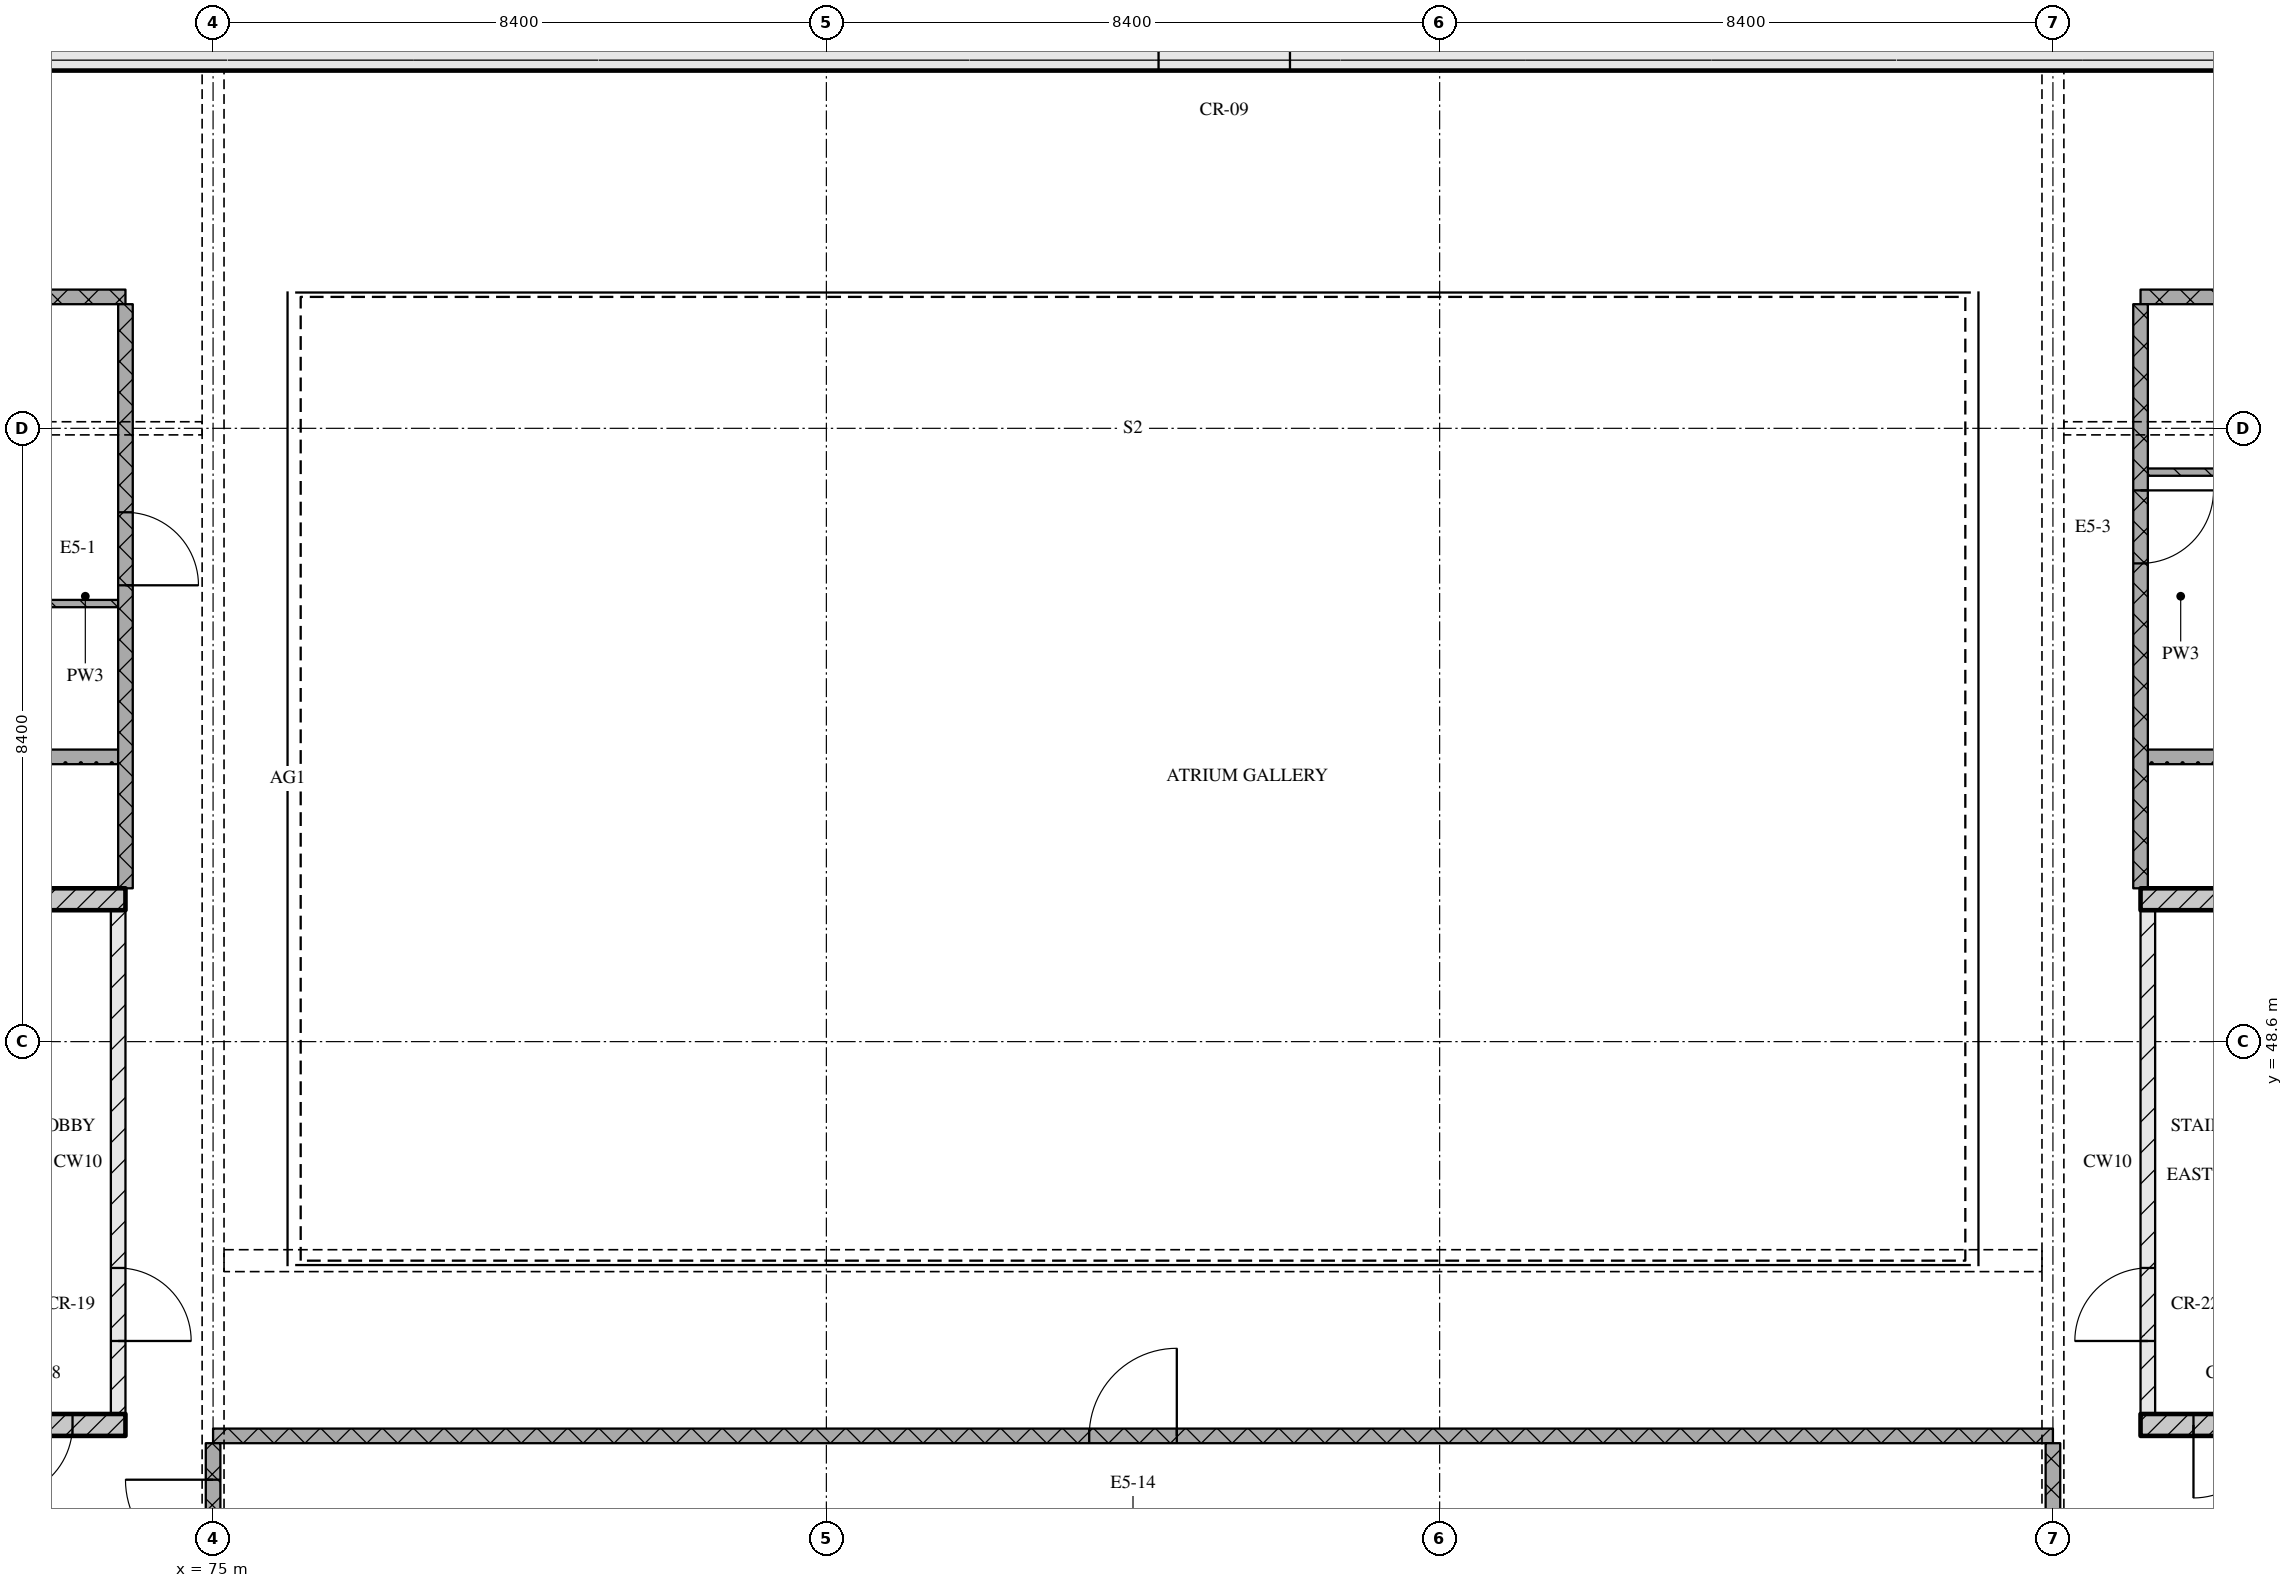
"""IFC4 building model, lengths in metres.
Left out: names, types, materials, properties, quantities, classifications, styles, units other than length and angle.
Written with IfcOpenShell. Run it as: python <this file> out.ifc"""

import sys

from ifc_helpers import new_model, si_unit, direction, frame, frame_2d, origin, place, context, subcontext, project, spatial, rectangle, extrude, element, fill, save


model = new_model("IFC4")
c1 = context("Model", 3, precision=1e-05, world=origin(), true_north=direction((0.0, 1.0)))
c2 = subcontext(c1, "Body", "Model", "MODEL_VIEW")
j1 = project(units=[si_unit("LENGTHUNIT", "METRE"), si_unit("PLANEANGLEUNIT", "RADIAN")], contexts=[c1])
p1 = place(None, origin())
s1 = spatial("IfcSite", under=j1, at=p1, CompositionType="ELEMENT")
p2 = place(p1, origin())
s2 = spatial("IfcBuilding", under=s1, at=p2, CompositionType="ELEMENT")
p3 = place(p2, frame((0.0, 0.0, 295.95)))
s3 = spatial("IfcBuildingStorey", under=s2, at=p3, CompositionType="ELEMENT", Elevation=295.95)
p4 = place(p3, frame((67.3, 62.15, 0.0), z_axis=(0.0, 0.0, 1.0), x_axis=(1.0, 0.0, 0.0)))
e1 = element("IfcWall", 1, at=p4, inside=s3, PredefinedType="SOLIDWALL", context=c2, shape_type="SweptSolid", body=[
    extrude(rectangle(XDim=40.6, YDim=0.5, at=frame_2d((20.3, 0.0))), origin(), (0.0, 0.0, 1.0), 3.32),
])
p5 = place(p4, frame((20.65, 0.0, 0.0)))
e2 = element("IfcOpeningElement", 2, at=p5, cuts=e1, PredefinedType="OPENING", context=c2, shape_type="SweptSolid", body=[
    extrude(rectangle(XDim=1.8, YDim=2.1, at=frame_2d((0.9, 1.05))), frame((0.0, 0.26, 0.0), z_axis=(0.0, -1.0, 0.0), x_axis=(1.0, 0.0, 0.0)), (0.0, 0.0, 1.0), 0.52),
])
p6 = place(p3, frame((68.2, 43.35, 0.0), z_axis=(0.0, 0.0, 1.0), x_axis=(1.0, 0.0, 0.0)))
e3 = element("IfcWall", 3, at=p6, inside=s3, PredefinedType="SOLIDWALL", context=c2, shape_type="SweptSolid", body=[
    extrude(rectangle(XDim=5.6, YDim=0.3, at=frame_2d((2.8, 0.0))), origin(), (0.0, 0.0, 1.0), 3.32),
])
p7 = place(p6, frame((3.875, 0.0, 0.0)))
e4 = element("IfcOpeningElement", 4, at=p7, cuts=e3, PredefinedType="OPENING", context=c2, shape_type="SweptSolid", body=[
    extrude(rectangle(XDim=1.0, YDim=2.1, at=frame_2d((0.5, 1.05))), frame((0.0, 0.16, 0.0), z_axis=(0.0, -1.0, 0.0), x_axis=(1.0, 0.0, 0.0)), (0.0, 0.0, 1.0), 0.32),
])
p8 = place(p3, frame((73.7, 43.5, 0.0), z_axis=(0.0, 0.0, 1.0), x_axis=(0.0, 1.0, 0.0)))
e5 = element("IfcWall", 5, at=p8, inside=s3, PredefinedType="PARTITIONING", context=c2, shape_type="SweptSolid", body=[
    extrude(rectangle(XDim=6.9, YDim=0.2, at=frame_2d((3.45, 0.0))), origin(), (0.0, 0.0, 1.0), 3.32),
])
p9 = place(p8, frame((1.0, 0.0, 0.0)))
e6 = element("IfcOpeningElement", 6, at=p9, cuts=e5, PredefinedType="OPENING", context=c2, shape_type="SweptSolid", body=[
    extrude(rectangle(XDim=1.0, YDim=2.1, at=frame_2d((0.5, 1.05))), frame((0.0, 0.11, 0.0), z_axis=(0.0, -1.0, 0.0), x_axis=(1.0, 0.0, 0.0)), (0.0, 0.0, 1.0), 0.22),
])
p10 = place(p3, frame((68.2, 50.55, 0.0), z_axis=(0.0, 0.0, 1.0), x_axis=(1.0, 0.0, 0.0)))
e7 = element("IfcWall", 7, at=p10, inside=s3, PredefinedType="SOLIDWALL", context=c2, shape_type="SweptSolid", body=[
    extrude(rectangle(XDim=5.6, YDim=0.3, at=frame_2d((2.8, 0.0))), origin(), (0.0, 0.0, 1.0), 3.32),
])
p11 = place(p3, frame((101.4, 43.35, 0.0), z_axis=(0.0, 0.0, 1.0), x_axis=(1.0, 0.0, 0.0)))
e8 = element("IfcWall", 8, at=p11, inside=s3, PredefinedType="SOLIDWALL", context=c2, shape_type="SweptSolid", body=[
    extrude(rectangle(XDim=5.6, YDim=0.3, at=frame_2d((2.8, 0.0))), origin(), (0.0, 0.0, 1.0), 3.32),
])
p12 = place(p11, frame((0.725, 0.0, 0.0)))
e9 = element("IfcOpeningElement", 9, at=p12, cuts=e8, PredefinedType="OPENING", context=c2, shape_type="SweptSolid", body=[
    extrude(rectangle(XDim=1.0, YDim=2.1, at=frame_2d((0.5, 1.05))), frame((0.0, 0.16, 0.0), z_axis=(0.0, -1.0, 0.0), x_axis=(1.0, 0.0, 0.0)), (0.0, 0.0, 1.0), 0.32),
])
p13 = place(p3, frame((101.5, 43.5, 0.0), z_axis=(0.0, 0.0, 1.0), x_axis=(0.0, 1.0, 0.0)))
e10 = element("IfcWall", 10, at=p13, inside=s3, PredefinedType="PARTITIONING", context=c2, shape_type="SweptSolid", body=[
    extrude(rectangle(XDim=6.9, YDim=0.2, at=frame_2d((3.45, 0.0))), origin(), (0.0, 0.0, 1.0), 3.32),
])
p14 = place(p13, frame((1.0, 0.0, 0.0)))
e11 = element("IfcOpeningElement", 11, at=p14, cuts=e10, PredefinedType="OPENING", context=c2, shape_type="SweptSolid", body=[
    extrude(rectangle(XDim=1.0, YDim=2.1, at=frame_2d((0.5, 1.05))), frame((0.0, 0.11, 0.0), z_axis=(0.0, -1.0, 0.0), x_axis=(1.0, 0.0, 0.0)), (0.0, 0.0, 1.0), 0.22),
])
p15 = place(p3, frame((101.4, 50.55, 0.0), z_axis=(0.0, 0.0, 1.0), x_axis=(1.0, 0.0, 0.0)))
e12 = element("IfcWall", 12, at=p15, inside=s3, PredefinedType="SOLIDWALL", context=c2, shape_type="SweptSolid", body=[
    extrude(rectangle(XDim=5.6, YDim=0.3, at=frame_2d((2.8, 0.0))), origin(), (0.0, 0.0, 1.0), 3.32),
])
p16 = place(p3, frame((100.2, 43.2, 0.0), z_axis=(0.0, 0.0, 1.0), x_axis=(-1.0, 0.0, 0.0)))
e13 = element("IfcWall", 13, at=p16, inside=s3, PredefinedType="PARTITIONING", context=c2, shape_type="SweptSolid", body=[
    extrude(rectangle(XDim=25.2, YDim=0.2, at=frame_2d((12.6, 0.0))), origin(), (0.0, 0.0, 1.0), 3.32),
])
p17 = place(p16, frame((12.0, 0.0, 0.0)))
e14 = element("IfcOpeningElement", 14, at=p17, cuts=e13, PredefinedType="OPENING", context=c2, shape_type="SweptSolid", body=[
    extrude(rectangle(XDim=1.2, YDim=2.1, at=frame_2d((0.6, 1.05))), frame((0.0, 0.11, 0.0), z_axis=(0.0, -1.0, 0.0), x_axis=(1.0, 0.0, 0.0)), (0.0, 0.0, 1.0), 0.22),
])
for number, where, z_axis, x_axis in (
    (15, (56.68, 52.5, 0.0), (0.0, 0.0, 1.0), (1.0, 0.0, 0.0)),
    (16, (101.5, 52.5, 0.0), (0.0, 0.0, 1.0), (1.0, 0.0, 0.0)),
):
    element("IfcWall", number, at=place(p3, frame(where, z_axis=z_axis, x_axis=x_axis)), inside=s3, PredefinedType="PARTITIONING", context=c2, shape_type="SweptSolid", body=[
        extrude(rectangle(XDim=17.02, YDim=0.2, at=frame_2d((8.51, 0.0))), origin(), (0.0, 0.0, 1.0), 3.32),
    ])
p18 = place(p3, frame((73.7, 54.6, 0.0), z_axis=(0.0, 0.0, 1.0), x_axis=(-1.0, 0.0, 0.0)))
e17 = element("IfcWall", 17, at=p18, inside=s3, PredefinedType="PARTITIONING", context=c2, shape_type="SweptSolid", body=[
    extrude(rectangle(XDim=8.9, YDim=0.1, at=frame_2d((4.45, 0.0))), origin(), (0.0, 0.0, 1.0), 3.32),
])
p19 = place(p18, frame((4.0, 0.0, 0.0)))
e18 = element("IfcOpeningElement", 18, at=p19, cuts=e17, PredefinedType="OPENING", context=c2, shape_type="SweptSolid", body=[
    extrude(rectangle(XDim=0.8, YDim=2.1, at=frame_2d((0.4, 1.05))), frame((0.0, 0.06, 0.0), z_axis=(0.0, -1.0, 0.0), x_axis=(1.0, 0.0, 0.0)), (0.0, 0.0, 1.0), 0.12),
])
p20 = place(p3, frame((101.5, 56.4, 0.0), z_axis=(0.0, 0.0, 1.0), x_axis=(1.0, 0.0, 0.0)))
e19 = element("IfcWall", 19, at=p20, inside=s3, PredefinedType="PARTITIONING", context=c2, shape_type="SweptSolid", body=[
    extrude(rectangle(XDim=8.0, YDim=0.1, at=frame_2d((4.0, 0.0))), origin(), (0.0, 0.0, 1.0), 3.32),
])
p21 = place(p20, frame((3.55, 0.0, 0.0)))
e20 = element("IfcOpeningElement", 20, at=p21, cuts=e19, PredefinedType="OPENING", context=c2, shape_type="SweptSolid", body=[
    extrude(rectangle(XDim=0.8, YDim=2.1, at=frame_2d((0.4, 1.05))), frame((0.0, 0.06, 0.0), z_axis=(0.0, -1.0, 0.0), x_axis=(1.0, 0.0, 0.0)), (0.0, 0.0, 1.0), 0.12),
])
for number, where, z_axis, x_axis in (
    (21, (64.2, 58.8, 0.0), (0.0, 0.0, 1.0), (1.0, 0.0, 0.0)),
    (22, (101.4, 58.8, 0.0), (0.0, 0.0, 1.0), (1.0, 0.0, 0.0)),
):
    element("IfcWall", number, at=place(p3, frame(where, z_axis=z_axis, x_axis=x_axis)), inside=s3, PredefinedType="PARTITIONING", context=c2, shape_type="SweptSolid", body=[
        extrude(rectangle(XDim=9.6, YDim=0.2, at=frame_2d((4.8, 0.0))), origin(), (0.0, 0.0, 1.0), 3.32),
    ])
p22 = place(p3, frame((73.8, 50.7, 0.0), z_axis=(0.0, 0.0, 1.0), x_axis=(0.0, 1.0, 0.0)))
e23 = element("IfcWall", 23, at=p22, inside=s3, PredefinedType="PARTITIONING", context=c2, shape_type="SweptSolid", body=[
    extrude(rectangle(XDim=8.0, YDim=0.2, at=frame_2d((4.0, 0.0))), origin(), (0.0, 0.0, 1.0), 3.32),
])
p23 = place(p22, frame((4.15, 0.0, 0.0)))
e24 = element("IfcOpeningElement", 24, at=p23, cuts=e23, PredefinedType="OPENING", context=c2, shape_type="SweptSolid", body=[
    extrude(rectangle(XDim=1.0, YDim=2.1, at=frame_2d((0.5, 1.05))), frame((0.0, 0.11, 0.0), z_axis=(0.0, -1.0, 0.0), x_axis=(1.0, 0.0, 0.0)), (0.0, 0.0, 1.0), 0.22),
])
p24 = place(p3, frame((75.0, 43.1, 0.0), z_axis=(0.0, 0.0, 1.0), x_axis=(0.0, -1.0, 0.0)))
e25 = element("IfcWall", 25, at=p24, inside=s3, PredefinedType="PARTITIONING", context=c2, shape_type="SweptSolid", body=[
    extrude(rectangle(XDim=2.2, YDim=0.2, at=frame_2d((1.1, 0.0))), origin(), (0.0, 0.0, 1.0), 2.53),
])
p25 = place(p24, frame((0.5, 0.0, 0.0)))
e26 = element("IfcOpeningElement", 26, at=p25, cuts=e25, PredefinedType="OPENING", context=c2, shape_type="SweptSolid", body=[
    extrude(rectangle(XDim=1.2, YDim=2.1, at=frame_2d((0.6, 1.05))), frame((0.0, 0.11, 0.0), z_axis=(0.0, -1.0, 0.0), x_axis=(1.0, 0.0, 0.0)), (0.0, 0.0, 1.0), 0.22),
])
p26 = place(p3, frame((100.2, 43.1, 0.0), z_axis=(0.0, 0.0, 1.0), x_axis=(0.0, -1.0, 0.0)))
e27 = element("IfcWall", 27, at=p26, inside=s3, PredefinedType="PARTITIONING", context=c2, shape_type="SweptSolid", body=[
    extrude(rectangle(XDim=2.2, YDim=0.2, at=frame_2d((1.1, 0.0))), origin(), (0.0, 0.0, 1.0), 2.53),
])
p27 = place(p3, frame((101.4, 58.7, 0.0), z_axis=(0.0, 0.0, 1.0), x_axis=(0.0, -1.0, 0.0)))
e28 = element("IfcWall", 28, at=p27, inside=s3, PredefinedType="PARTITIONING", context=c2, shape_type="SweptSolid", body=[
    extrude(rectangle(XDim=8.0, YDim=0.2, at=frame_2d((4.0, 0.0))), origin(), (0.0, 0.0, 1.0), 3.32),
])
p28 = place(p27, frame((2.55, 0.0, 0.0)))
e29 = element("IfcOpeningElement", 29, at=p28, cuts=e28, PredefinedType="OPENING", context=c2, shape_type="SweptSolid", body=[
    extrude(rectangle(XDim=1.0, YDim=2.1, at=frame_2d((0.5, 1.05))), frame((0.0, 0.11, 0.0), z_axis=(0.0, -1.0, 0.0), x_axis=(1.0, 0.0, 0.0)), (0.0, 0.0, 1.0), 0.22),
])
p29 = place(p5, origin())
e30 = element("IfcDoor", 30, at=p29, inside=s3, OperationType="DOUBLE_DOOR_SINGLE_SWING", PredefinedType="DOOR", context=c2, shape_type="SweptSolid", body=[
    extrude(rectangle(XDim=1.8, YDim=2.1, at=frame_2d((0.9, 1.05))), frame((0.0, 0.025, 0.0), z_axis=(0.0, -1.0, 0.0), x_axis=(1.0, 0.0, 0.0)), (0.0, 0.0, 1.0), 0.05),
])
fill(e2, e30)
p30 = place(p7, origin())
e31 = element("IfcDoor", 31, at=p30, inside=s3, OperationType="SINGLE_SWING_RIGHT", PredefinedType="DOOR", context=c2, shape_type="SweptSolid", body=[
    extrude(rectangle(XDim=1.0, YDim=2.1, at=frame_2d((0.5, 1.05))), frame((0.0, 0.025, 0.0), z_axis=(0.0, -1.0, 0.0), x_axis=(1.0, 0.0, 0.0)), (0.0, 0.0, 1.0), 0.05),
])
fill(e4, e31)
p31 = place(p9, origin())
e32 = element("IfcDoor", 32, at=p31, inside=s3, OperationType="SINGLE_SWING_RIGHT", PredefinedType="DOOR", context=c2, shape_type="SweptSolid", body=[
    extrude(rectangle(XDim=1.0, YDim=2.1, at=frame_2d((0.5, 1.05))), frame((0.0, 0.025, 0.0), z_axis=(0.0, -1.0, 0.0), x_axis=(1.0, 0.0, 0.0)), (0.0, 0.0, 1.0), 0.05),
])
fill(e6, e32)
p32 = place(p12, origin())
e33 = element("IfcDoor", 33, at=p32, inside=s3, OperationType="SINGLE_SWING_RIGHT", PredefinedType="DOOR", context=c2, shape_type="SweptSolid", body=[
    extrude(rectangle(XDim=1.0, YDim=2.1, at=frame_2d((0.5, 1.05))), frame((0.0, 0.025, 0.0), z_axis=(0.0, -1.0, 0.0), x_axis=(1.0, 0.0, 0.0)), (0.0, 0.0, 1.0), 0.05),
])
fill(e9, e33)
p33 = place(p14, origin())
e34 = element("IfcDoor", 34, at=p33, inside=s3, OperationType="SINGLE_SWING_LEFT", PredefinedType="DOOR", context=c2, shape_type="SweptSolid", body=[
    extrude(rectangle(XDim=1.0, YDim=2.1, at=frame_2d((0.5, 1.05))), frame((0.0, 0.025, 0.0), z_axis=(0.0, -1.0, 0.0), x_axis=(1.0, 0.0, 0.0)), (0.0, 0.0, 1.0), 0.05),
])
fill(e11, e34)
p34 = place(p17, origin())
e35 = element("IfcDoor", 35, at=p34, inside=s3, OperationType="SINGLE_SWING_RIGHT", PredefinedType="DOOR", context=c2, shape_type="SweptSolid", body=[
    extrude(rectangle(XDim=1.2, YDim=2.1, at=frame_2d((0.6, 1.05))), frame((0.0, 0.025, 0.0), z_axis=(0.0, -1.0, 0.0), x_axis=(1.0, 0.0, 0.0)), (0.0, 0.0, 1.0), 0.05),
])
fill(e14, e35)
p35 = place(p23, origin())
e36 = element("IfcDoor", 36, at=p35, inside=s3, OperationType="SINGLE_SWING_RIGHT", PredefinedType="DOOR", context=c2, shape_type="SweptSolid", body=[
    extrude(rectangle(XDim=1.0, YDim=2.1, at=frame_2d((0.5, 1.05))), frame((0.0, 0.025, 0.0), z_axis=(0.0, -1.0, 0.0), x_axis=(1.0, 0.0, 0.0)), (0.0, 0.0, 1.0), 0.05),
])
fill(e24, e36)
p36 = place(p25, origin())
e37 = element("IfcDoor", 37, at=p36, inside=s3, OperationType="SINGLE_SWING_RIGHT", PredefinedType="DOOR", context=c2, shape_type="SweptSolid", body=[
    extrude(rectangle(XDim=1.2, YDim=2.1, at=frame_2d((0.6, 1.05))), frame((0.0, 0.025, 0.0), z_axis=(0.0, -1.0, 0.0), x_axis=(1.0, 0.0, 0.0)), (0.0, 0.0, 1.0), 0.05),
])
fill(e26, e37)
p37 = place(p28, origin())
e38 = element("IfcDoor", 38, at=p37, inside=s3, OperationType="SINGLE_SWING_LEFT", PredefinedType="DOOR", context=c2, shape_type="SweptSolid", body=[
    extrude(rectangle(XDim=1.0, YDim=2.1, at=frame_2d((0.5, 1.05))), frame((0.0, 0.025, 0.0), z_axis=(0.0, -1.0, 0.0), x_axis=(1.0, 0.0, 0.0)), (0.0, 0.0, 1.0), 0.05),
])
fill(e29, e38)
save(model, sys.argv[1])
